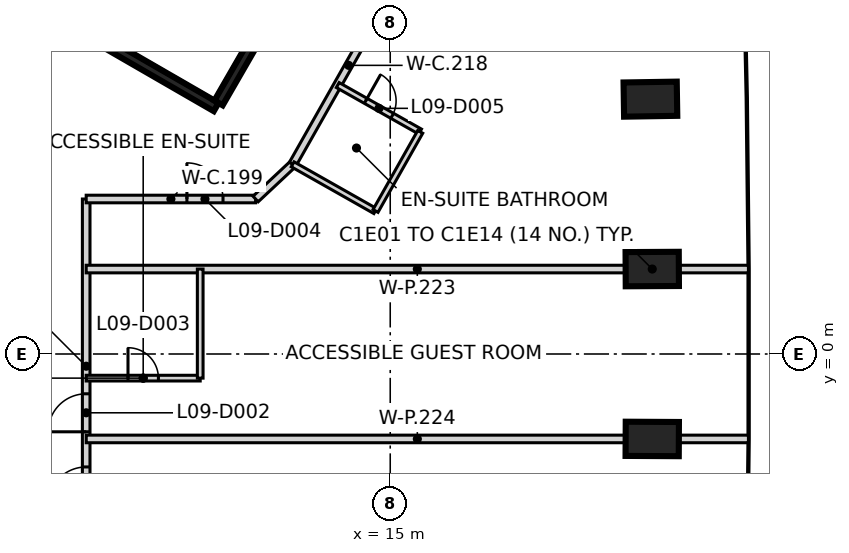
"""IFC4 building model, lengths in metres.
Left out: names, types, materials, properties, quantities, classifications, styles, units other than length and angle.
Written with IfcOpenShell. Run it as: python <this file> out.ifc"""

import sys

from ifc_helpers import new_model, si_unit, direction, frame, frame_2d, origin, origin_2d, place, context, subcontext, project, spatial, rectangle, extrude, element, fill, save


model = new_model("IFC4")
c1 = context("Model", 3, precision=1e-05, world=origin(), true_north=direction((0.0, 1.0)))
c2 = subcontext(c1, "Body", "Model", "MODEL_VIEW")
j1 = project(units=[si_unit("LENGTHUNIT", "METRE"), si_unit("PLANEANGLEUNIT", "RADIAN")], contexts=[c1])
p1 = place(None, origin())
s1 = spatial("IfcSite", under=j1, at=p1, CompositionType="ELEMENT")
p2 = place(p1, origin())
s2 = spatial("IfcBuilding", under=s1, at=p2, CompositionType="ELEMENT")
p3 = place(p2, frame((0.0, 0.0, 45.8)))
s3 = spatial("IfcBuildingStorey", under=s2, at=p3, CompositionType="ELEMENT", Elevation=45.8)
for number, where, z_axis, x_axis in (
    (1, (21.894, -2.235, -0.475), (0.0, 0.0, 1.0), (-1.0, 0.005, 0.0)),
    (2, (21.894, 2.235, -0.475), (0.0, 0.0, 1.0), (1.0, 0.005, 0.0)),
    (3, (21.846, 6.706, -0.475), (0.0, 0.0, 1.0), (1.0, 0.016, 0.0)),
):
    element("IfcColumn", number, at=place(p3, frame(where, z_axis=z_axis, x_axis=x_axis)), inside=s3, PredefinedType="COLUMN", context=c2, shape_type="SweptSolid", body=[
        extrude(rectangle(XDim=1.4, YDim=0.9, at=origin_2d()), origin(), (0.0, 0.0, 1.0), 3.6),
    ])
p4 = place(p3, frame((10.42, 6.498, 0.0), z_axis=(0.0, 0.0, 1.0), x_axis=(-0.866021906294, 0.500006057782, 0.0)))
e4 = element("IfcWall", 4, at=p4, inside=s3, PredefinedType="SHEAR", context=c2, shape_type="SweptSolid", body=[
    extrude(rectangle(XDim=11.55, YDim=0.25, at=frame_2d((5.775, 0.0))), origin(), (0.0, 0.0, 1.0), 3.125),
])
p5 = place(p4, frame((10.025, 0.0, 0.0)))
e5 = element("IfcOpeningElement", 5, at=p5, cuts=e4, PredefinedType="OPENING", context=c2, shape_type="SweptSolid", body=[
    extrude(rectangle(XDim=1.2, YDim=2.1, at=frame_2d((0.6, 1.05))), frame((0.0, 0.135, 0.0), z_axis=(0.0, -1.0, 0.0), x_axis=(1.0, 0.0, 0.0)), (0.0, 0.0, 1.0), 0.27),
])
p6 = place(p4, frame((8.725, 0.0, 0.0)))
e6 = element("IfcOpeningElement", 6, at=p6, cuts=e4, PredefinedType="OPENING", context=c2, shape_type="SweptSolid", body=[
    extrude(rectangle(XDim=1.2, YDim=2.1, at=frame_2d((0.6, 1.05))), frame((0.0, 0.135, 0.0), z_axis=(0.0, -1.0, 0.0), x_axis=(1.0, 0.0, 0.0)), (0.0, 0.0, 1.0), 0.27),
])
p7 = place(p3, frame((13.238, 11.378, 0.0), z_axis=(0.0, 0.0, 1.0), x_axis=(-0.500008851346, -0.866020293397, 0.0)))
e7 = element("IfcWall", 7, at=p7, inside=s3, PredefinedType="SHEAR", context=c2, shape_type="SweptSolid", body=[
    extrude(rectangle(XDim=5.51, YDim=0.25, at=frame_2d((2.755, 0.0))), origin(), (0.0, 0.0, 1.0), 3.125),
])
p8 = place(p3, frame((7.0, -4.721, 0.0), z_axis=(0.0, 0.0, 1.0), x_axis=(0.0, 1.0, 0.0)))
e8 = element("IfcWall", 8, at=p8, inside=s3, PredefinedType="PARTITIONING", context=c2, shape_type="SweptSolid", body=[
    extrude(rectangle(XDim=8.799, YDim=0.2, at=frame_2d((4.399, 0.0))), origin(), (0.0, 0.0, 1.0), 3.125),
])
p9 = place(p8, frame((0.749, 0.0, 0.0)))
e9 = element("IfcOpeningElement", 9, at=p9, cuts=e8, PredefinedType="OPENING", context=c2, shape_type="SweptSolid", body=[
    extrude(rectangle(XDim=1.0, YDim=2.1, at=frame_2d((0.5, 1.05))), frame((0.0, 0.11, 0.0), z_axis=(0.0, -1.0, 0.0), x_axis=(1.0, 0.0, 0.0)), (0.0, 0.0, 1.0), 0.22),
])
p10 = place(p8, frame((2.674, 0.0, 0.0)))
e10 = element("IfcOpeningElement", 10, at=p10, cuts=e8, PredefinedType="OPENING", context=c2, shape_type="SweptSolid", body=[
    extrude(rectangle(XDim=1.0, YDim=2.1, at=frame_2d((0.5, 1.05))), frame((0.0, 0.11, 0.0), z_axis=(0.0, -1.0, 0.0), x_axis=(1.0, 0.0, 0.0)), (0.0, 0.0, 1.0), 0.22),
])
p11 = place(p3, frame((7.0, 4.078, 0.0), z_axis=(0.0, 0.0, 1.0), x_axis=(1.0, 0.0, 0.0)))
e11 = element("IfcWall", 11, at=p11, inside=s3, PredefinedType="PARTITIONING", context=c2, shape_type="SweptSolid", body=[
    extrude(rectangle(XDim=4.458, YDim=0.2, at=frame_2d((2.229, 0.0))), origin(), (0.0, 0.0, 1.0), 3.125),
])
p12 = place(p11, frame((2.65, 0.0, 0.0)))
e12 = element("IfcOpeningElement", 12, at=p12, cuts=e11, PredefinedType="OPENING", context=c2, shape_type="SweptSolid", body=[
    extrude(rectangle(XDim=0.95, YDim=2.1, at=frame_2d((0.475, 1.05))), frame((0.0, 0.11, 0.0), z_axis=(0.0, -1.0, 0.0), x_axis=(1.0, 0.0, 0.0)), (0.0, 0.0, 1.0), 0.22),
])
p13 = place(p3, frame((11.458, 4.078, 0.0), z_axis=(0.0, 0.0, 1.0), x_axis=(0.729936032318, 0.683515463412, 0.0)))
e13 = element("IfcWall", 13, at=p13, inside=s3, PredefinedType="PARTITIONING", context=c2, shape_type="SweptSolid", body=[
    extrude(rectangle(XDim=1.336, YDim=0.2, at=frame_2d((0.668, 0.0))), origin(), (0.0, 0.0, 1.0), 3.125),
])
p14 = place(p3, frame((12.432, 4.992, 0.0), z_axis=(0.0, 0.0, 1.0), x_axis=(0.492790102015, 0.870148214591, 0.0)))
e14 = element("IfcWall", 14, at=p14, inside=s3, PredefinedType="PARTITIONING", context=c2, shape_type="SweptSolid", body=[
    extrude(rectangle(XDim=5.981, YDim=0.2, at=frame_2d((2.991, 0.0))), origin(), (0.0, 0.0, 1.0), 3.125),
])
p15 = place(p3, frame((7.0, 2.235, 0.0), z_axis=(0.0, 0.0, 1.0), x_axis=(1.0, 0.0, 0.0)))
e15 = element("IfcWall", 15, at=p15, inside=s3, PredefinedType="PARTITIONING", context=c2, shape_type="SweptSolid", body=[
    extrude(rectangle(XDim=17.425, YDim=0.2, at=frame_2d((8.712, 0.0))), origin(), (0.0, 0.0, 1.0), 3.125),
])
p16 = place(p3, frame((7.001, -2.235, 0.0), z_axis=(0.0, 0.0, 1.0), x_axis=(1.0, 0.0, 0.0)))
e16 = element("IfcWall", 16, at=p16, inside=s3, PredefinedType="PARTITIONING", context=c2, shape_type="SweptSolid", body=[
    extrude(rectangle(XDim=17.424, YDim=0.2, at=frame_2d((8.712, 0.0))), origin(), (0.0, 0.0, 1.0), 3.125),
])
p17 = place(p3, frame((7.0, -0.635, 0.0), z_axis=(0.0, 0.0, 1.0), x_axis=(1.0, 0.0, 0.0)))
e17 = element("IfcWall", 17, at=p17, inside=s3, PredefinedType="PARTITIONING", context=c2, shape_type="SweptSolid", body=[
    extrude(rectangle(XDim=3.0, YDim=0.15, at=frame_2d((1.5, 0.0))), origin(), (0.0, 0.0, 1.0), 3.125),
])
p18 = place(p17, frame((1.1, 0.0, 0.0)))
e18 = element("IfcOpeningElement", 18, at=p18, cuts=e17, PredefinedType="OPENING", context=c2, shape_type="SweptSolid", body=[
    extrude(rectangle(XDim=0.8, YDim=2.1, at=frame_2d((0.4, 1.05))), frame((0.0, 0.085, 0.0), z_axis=(0.0, -1.0, 0.0), x_axis=(1.0, 0.0, 0.0)), (0.0, 0.0, 1.0), 0.17),
])
p19 = place(p3, frame((10.0, -0.635, 0.0), z_axis=(0.0, 0.0, 1.0), x_axis=(0.0, 1.0, 0.0)))
e19 = element("IfcWall", 19, at=p19, inside=s3, PredefinedType="PARTITIONING", context=c2, shape_type="SweptSolid", body=[
    extrude(rectangle(XDim=2.87, YDim=0.15, at=frame_2d((1.435, 0.0))), origin(), (0.0, 0.0, 1.0), 3.125),
])
p20 = place(p3, frame((12.433, 4.991, 0.0), z_axis=(0.0, 0.0, 1.0), x_axis=(0.870173052757, -0.49274624124, 0.0)))
e20 = element("IfcWall", 20, at=p20, inside=s3, PredefinedType="PARTITIONING", context=c2, shape_type="SweptSolid", body=[
    extrude(rectangle(XDim=2.498, YDim=0.15, at=frame_2d((1.249, 0.0))), origin(), (0.0, 0.0, 1.0), 3.125),
])
p21 = place(p3, frame((13.619, 7.076, 0.0), z_axis=(0.0, 0.0, 1.0), x_axis=(0.870725399165, -0.491769538758, 0.0)))
e21 = element("IfcWall", 21, at=p21, inside=s3, PredefinedType="PARTITIONING", context=c2, shape_type="SweptSolid", body=[
    extrude(rectangle(XDim=2.489, YDim=0.15, at=frame_2d((1.244, 0.0))), origin(), (0.0, 0.0, 1.0), 3.125),
])
p22 = place(p21, frame((0.845, 0.0, 0.0)))
e22 = element("IfcOpeningElement", 22, at=p22, cuts=e21, PredefinedType="OPENING", context=c2, shape_type="SweptSolid", body=[
    extrude(rectangle(XDim=0.8, YDim=2.1, at=frame_2d((0.4, 1.05))), frame((0.0, 0.085, 0.0), z_axis=(0.0, -1.0, 0.0), x_axis=(1.0, 0.0, 0.0)), (0.0, 0.0, 1.0), 0.17),
])
p23 = place(p3, frame((14.613, 3.764, 0.0), z_axis=(0.0, 0.0, 1.0), x_axis=(0.492121164181, 0.870526713987, 0.0)))
e23 = element("IfcWall", 23, at=p23, inside=s3, PredefinedType="PARTITIONING", context=c2, shape_type="SweptSolid", body=[
    extrude(rectangle(XDim=2.392, YDim=0.15, at=frame_2d((1.196, 0.0))), origin(), (0.0, 0.0, 1.0), 3.125),
])
p24 = place(p9, frame((1.0, 0.0, 0.0), z_axis=(0.0, 0.0, 1.0), x_axis=(-1.0, 0.0, 0.0)))
e24 = element("IfcDoor", 24, at=p24, inside=s3, OperationType="SINGLE_SWING_LEFT", PredefinedType="DOOR", context=c2, shape_type="SweptSolid", body=[
    extrude(rectangle(XDim=1.0, YDim=2.1, at=frame_2d((0.5, 1.05))), frame((0.0, 0.025, 0.0), z_axis=(0.0, -1.0, 0.0), x_axis=(1.0, 0.0, 0.0)), (0.0, 0.0, 1.0), 0.05),
])
fill(e9, e24)
p25 = place(p10, frame((1.0, 0.0, 0.0), z_axis=(0.0, 0.0, 1.0), x_axis=(-1.0, 0.0, 0.0)))
e25 = element("IfcDoor", 25, at=p25, inside=s3, OperationType="SINGLE_SWING_LEFT", PredefinedType="DOOR", context=c2, shape_type="SweptSolid", body=[
    extrude(rectangle(XDim=1.0, YDim=2.1, at=frame_2d((0.5, 1.05))), frame((0.0, 0.025, 0.0), z_axis=(0.0, -1.0, 0.0), x_axis=(1.0, 0.0, 0.0)), (0.0, 0.0, 1.0), 0.05),
])
fill(e10, e25)
p26 = place(p18, origin())
e26 = element("IfcDoor", 26, at=p26, inside=s3, OperationType="SINGLE_SWING_LEFT", PredefinedType="DOOR", context=c2, shape_type="SweptSolid", body=[
    extrude(rectangle(XDim=0.8, YDim=2.1, at=frame_2d((0.4, 1.05))), frame((0.0, 0.025, 0.0), z_axis=(0.0, -1.0, 0.0), x_axis=(1.0, 0.0, 0.0)), (0.0, 0.0, 1.0), 0.05),
])
fill(e18, e26)
p27 = place(p12, origin())
e27 = element("IfcDoor", 27, at=p27, inside=s3, OperationType="SINGLE_SWING_LEFT", PredefinedType="DOOR", context=c2, shape_type="SweptSolid", body=[
    extrude(rectangle(XDim=0.95, YDim=2.1, at=frame_2d((0.475, 1.05))), frame((0.0, 0.025, 0.0), z_axis=(0.0, -1.0, 0.0), x_axis=(1.0, 0.0, 0.0)), (0.0, 0.0, 1.0), 0.05),
])
fill(e12, e27)
p28 = place(p22, origin())
e28 = element("IfcDoor", 28, at=p28, inside=s3, OperationType="SINGLE_SWING_LEFT", PredefinedType="DOOR", context=c2, shape_type="SweptSolid", body=[
    extrude(rectangle(XDim=0.8, YDim=2.1, at=frame_2d((0.4, 1.05))), frame((0.0, 0.025, 0.0), z_axis=(0.0, -1.0, 0.0), x_axis=(1.0, 0.0, 0.0)), (0.0, 0.0, 1.0), 0.05),
])
fill(e22, e28)
save(model, sys.argv[1])
